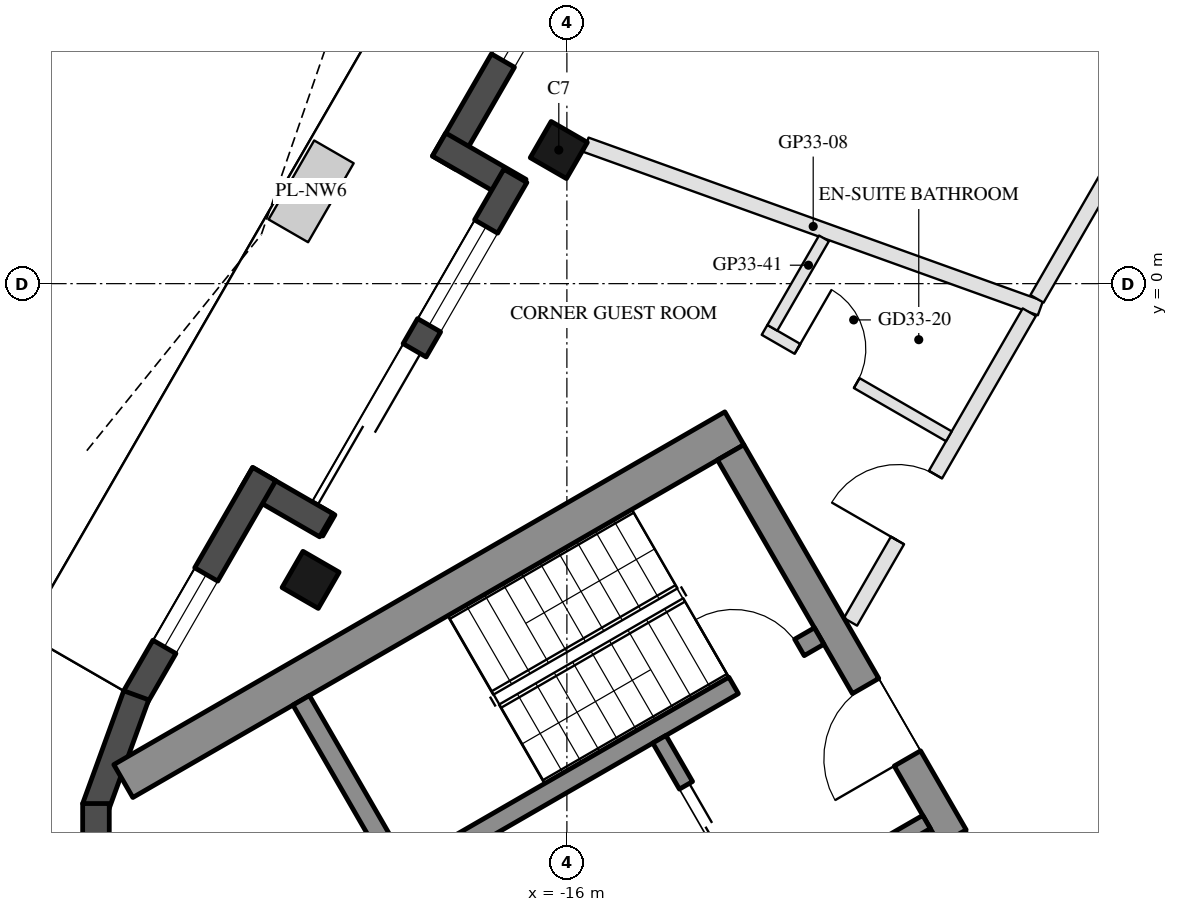
"""IFC4 building model, lengths in metres.
Left out: names, types, materials, properties, quantities, classifications, styles, units other than length and angle.
Written with IfcOpenShell. Run it as: python <this file> out.ifc"""

import sys

from ifc_helpers import new_model, si_unit, direction, frame, frame_2d, origin, origin_2d, place, context, subcontext, project, spatial, rectangle, hollow_rectangle, extrude, boolean, halfspace, element, fill, save


model = new_model("IFC4")
c1 = context("Model", 3, precision=1e-05, world=origin(), true_north=direction((0.0, 1.0)))
c2 = subcontext(c1, "Body", "Model", "MODEL_VIEW")
j1 = project(units=[si_unit("LENGTHUNIT", "METRE"), si_unit("PLANEANGLEUNIT", "RADIAN")], contexts=[c1])
p1 = place(None, origin())
s1 = spatial("IfcSite", under=j1, at=p1, CompositionType="ELEMENT")
p2 = place(p1, origin())
s2 = spatial("IfcBuilding", under=s1, at=p2, CompositionType="ELEMENT")
p3 = place(p2, frame((0.0, 0.0, 317.0)))
s3 = spatial("IfcBuildingStorey", under=s2, at=p3, CompositionType="ELEMENT", Elevation=317.0)
p4 = place(p3, frame((-16.106, 1.758, 0.0), z_axis=(0.0, 0.0, 1.0), x_axis=(0.5, 0.866025403784, 0.0)))
e1 = element("IfcColumn", 1, at=p4, inside=s3, PredefinedType="COLUMN", context=c2, shape_type="SweptSolid", body=[
    boolean("DIFFERENCE", extrude(hollow_rectangle(XDim=0.55, YDim=0.55, WallThickness=0.025, at=origin_2d()), origin(), (0.0, 0.0, 1.0), 3.7), halfspace(frame((0.0, 0.0, 3.666), z_axis=(0.0, 0.0, 1.0), x_axis=(1.0, 0.0, 0.0)), False)),
])
p5 = place(p3, frame((-19.372, -3.898, 0.0), z_axis=(0.0, 0.0, 1.0), x_axis=(0.5, 0.866025403784, 0.0)))
e2 = element("IfcColumn", 2, at=p5, inside=s3, PredefinedType="COLUMN", context=c2, shape_type="SweptSolid", body=[
    boolean("DIFFERENCE", extrude(hollow_rectangle(XDim=0.55, YDim=0.55, WallThickness=0.025, at=origin_2d()), origin(), (0.0, 0.0, 1.0), 3.7), halfspace(frame((0.0, 0.0, 3.66), z_axis=(0.0, 0.0, 1.0), x_axis=(1.0, 0.0, 0.0)), False)),
])
p6 = place(p3, frame((-13.452, 8.806, 0.0), z_axis=(0.0, 0.0, 1.0), x_axis=(-0.499993893925, -0.8660289291, 0.0)))
e3 = element("IfcWall", 3, at=p6, inside=s3, PredefinedType="SOLIDWALL", context=c2, shape_type="SweptSolid", body=[
    extrude(rectangle(XDim=8.331, YDim=0.35, at=frame_2d((4.165, 0.0))), origin(), (0.0, 0.0, 1.0), 3.55),
])
p7 = place(p6, frame((1.525, 0.0, 0.0)))
e4 = element("IfcOpeningElement", 4, at=p7, cuts=e3, PredefinedType="OPENING", context=c2, shape_type="SweptSolid", body=[
    extrude(rectangle(XDim=2.4, YDim=2.4, at=frame_2d((1.2, 1.2))), frame((0.0, 0.185, 0.0), z_axis=(0.0, -1.0, 0.0), x_axis=(1.0, 0.0, 0.0)), (0.0, 0.0, 1.0), 0.37),
])
p8 = place(p6, frame((4.225, 0.0, 0.3)))
e5 = element("IfcOpeningElement", 5, at=p8, cuts=e3, PredefinedType="OPENING", context=c2, shape_type="SweptSolid", body=[
    extrude(rectangle(XDim=0.8, YDim=2.65, at=frame_2d((0.4, 1.325))), frame((0.0, 0.185, 0.0), z_axis=(0.0, -1.0, 0.0), x_axis=(1.0, 0.0, 0.0)), (0.0, 0.0, 1.0), 0.37),
])
p9 = place(p6, frame((5.779, 0.0, 0.3)))
e6 = element("IfcOpeningElement", 6, at=p9, cuts=e3, PredefinedType="OPENING", context=c2, shape_type="SweptSolid", body=[
    extrude(rectangle(XDim=1.0, YDim=2.65, at=frame_2d((0.5, 1.325))), frame((0.0, 0.185, 0.0), z_axis=(0.0, -1.0, 0.0), x_axis=(1.0, 0.0, 0.0)), (0.0, 0.0, 1.0), 0.37),
])
p10 = place(p3, frame((-17.681, 1.83, 0.0), z_axis=(0.0, 0.0, 1.0), x_axis=(0.866092288191, -0.499884134912, 0.0)))
e7 = element("IfcWall", 7, at=p10, inside=s3, PredefinedType="SOLIDWALL", context=c2, shape_type="SweptSolid", body=[
    extrude(rectangle(XDim=1.22, YDim=0.35, at=frame_2d((0.61, 0.0))), origin(), (0.0, 0.0, 1.0), 3.55),
])
p11 = place(p3, frame((-16.678, 1.418, 0.0), z_axis=(0.0, 0.0, 1.0), x_axis=(-0.499996591357, -0.866027371756, 0.0)))
e8 = element("IfcWall", 8, at=p11, inside=s3, PredefinedType="SOLIDWALL", context=c2, shape_type="SweptSolid", body=[
    extrude(rectangle(XDim=5.371, YDim=0.35, at=frame_2d((2.685, 0.0))), origin(), (0.0, 0.0, 1.0), 3.55),
])
p12 = place(p11, frame((2.651, 0.0, 0.0)))
e9 = element("IfcOpeningElement", 9, at=p12, cuts=e8, PredefinedType="OPENING", context=c2, shape_type="SweptSolid", body=[
    extrude(rectangle(XDim=2.4, YDim=2.4, at=frame_2d((1.2, 1.2))), frame((0.0, 0.185, 0.0), z_axis=(0.0, -1.0, 0.0), x_axis=(1.0, 0.0, 0.0)), (0.0, 0.0, 1.0), 0.37),
])
p13 = place(p11, frame((0.77, 0.0, 0.3)))
e10 = element("IfcOpeningElement", 10, at=p13, cuts=e8, PredefinedType="OPENING", context=c2, shape_type="SweptSolid", body=[
    extrude(rectangle(XDim=1.5, YDim=2.65, at=frame_2d((0.75, 1.325))), frame((0.0, 0.185, 0.0), z_axis=(0.0, -1.0, 0.0), x_axis=(1.0, 0.0, 0.0)), (0.0, 0.0, 1.0), 0.37),
])
p14 = place(p3, frame((-19.165, -3.18, 0.0), z_axis=(0.0, 0.0, 1.0), x_axis=(-0.866005645448, 0.500034220881, 0.0)))
e11 = element("IfcWall", 11, at=p14, inside=s3, PredefinedType="SOLIDWALL", context=c2, shape_type="SweptSolid", body=[
    extrude(rectangle(XDim=1.22, YDim=0.35, at=frame_2d((0.61, 0.0))), origin(), (0.0, 0.0, 1.0), 3.55),
])
p15 = place(p3, frame((-19.982, -2.506, 0.0), z_axis=(0.0, 0.0, 1.0), x_axis=(-0.500054617923, -0.865993867816, 0.0)))
e12 = element("IfcWall", 12, at=p15, inside=s3, PredefinedType="SOLIDWALL", context=c2, shape_type="SweptSolid", body=[
    extrude(rectangle(XDim=3.393, YDim=0.35, at=frame_2d((1.697, 0.0))), origin(), (0.0, 0.0, 1.0), 3.55),
])
p16 = place(p15, frame((1.525, 0.0, 0.3)))
e13 = element("IfcOpeningElement", 13, at=p16, cuts=e12, PredefinedType="OPENING", context=c2, shape_type="SweptSolid", body=[
    extrude(rectangle(XDim=1.1, YDim=2.65, at=frame_2d((0.55, 1.325))), frame((0.0, 0.185, 0.0), z_axis=(0.0, -1.0, 0.0), x_axis=(1.0, 0.0, 0.0)), (0.0, 0.0, 1.0), 0.37),
])
for number, where, z_axis, x_axis in (
    (14, (-21.666, -5.417, 0.0), (0.0, 0.0, 1.0), (-0.342, -0.94, 0.0)),
    (15, (-22.196, -6.841, 0.0), (0.0, 0.0, 1.0), (0.0, -1.0, 0.0)),
):
    element("IfcWall", number, at=place(p3, frame(where, z_axis=z_axis, x_axis=x_axis)), inside=s3, PredefinedType="SOLIDWALL", context=c2, shape_type="SweptSolid", body=[
        extrude(rectangle(XDim=1.579, YDim=0.35, at=frame_2d((0.79, 0.0))), origin(), (0.0, 0.0, 1.0), 3.55),
    ])
p17 = place(p3, frame((-13.797, -1.903, 0.0), z_axis=(0.0, 0.0, 1.0), x_axis=(-0.866025286072, -0.500000203884, 0.0)))
e16 = element("IfcWall", 16, at=p17, inside=s3, PredefinedType="SHEAR", context=c2, shape_type="SweptSolid", body=[
    extrude(rectangle(XDim=9.283, YDim=0.5, at=frame_2d((4.641, 0.0))), origin(), (0.0, 0.0, 1.0), 3.5),
])
p18 = place(p3, frame((-13.845, -2.22, 0.0), z_axis=(0.0, 0.0, 1.0), x_axis=(0.500004234368, -0.866022959057, 0.0)))
e17 = element("IfcWall", 17, at=p18, inside=s3, PredefinedType="SHEAR", context=c2, shape_type="SweptSolid", body=[
    extrude(rectangle(XDim=10.0, YDim=0.4, at=frame_2d((5.0, 0.0))), origin(), (0.0, 0.0, 1.0), 3.5),
])
p19 = place(p18, frame((3.55, 0.0, 0.0)))
e18 = element("IfcOpeningElement", 18, at=p19, cuts=e17, PredefinedType="OPENING", context=c2, shape_type="SweptSolid", body=[
    extrude(rectangle(XDim=1.1, YDim=2.1, at=frame_2d((0.55, 1.05))), frame((0.0, 0.21, 0.0), z_axis=(0.0, -1.0, 0.0), x_axis=(1.0, 0.0, 0.0)), (0.0, 0.0, 1.0), 0.42),
])
p20 = place(p18, frame((5.85, 0.0, 0.0)))
e19 = element("IfcOpeningElement", 19, at=p20, cuts=e17, PredefinedType="OPENING", context=c2, shape_type="SweptSolid", body=[
    extrude(rectangle(XDim=1.4, YDim=2.1, at=frame_2d((0.7, 1.05))), frame((0.0, 0.21, 0.0), z_axis=(0.0, -1.0, 0.0), x_axis=(1.0, 0.0, 0.0)), (0.0, 0.0, 1.0), 0.42),
])
p21 = place(p3, frame((-12.681, -4.636, 0.0), z_axis=(0.0, 0.0, 1.0), x_axis=(-0.866021702275, -0.500006411147, 0.0)))
e20 = element("IfcWall", 20, at=p21, inside=s3, PredefinedType="SHEAR", context=c2, shape_type="SweptSolid", body=[
    extrude(rectangle(XDim=6.45, YDim=0.25, at=frame_2d((3.225, 0.0))), origin(), (0.0, 0.0, 1.0), 3.5),
])
p22 = place(p21, frame((0.3, 0.0, 0.0)))
e21 = element("IfcOpeningElement", 21, at=p22, cuts=e20, PredefinedType="OPENING", context=c2, shape_type="SweptSolid", body=[
    extrude(rectangle(XDim=1.0, YDim=2.1, at=frame_2d((0.5, 1.05))), frame((0.0, 0.135, 0.0), z_axis=(0.0, -1.0, 0.0), x_axis=(1.0, 0.0, 0.0)), (0.0, 0.0, 1.0), 0.27),
])
p23 = place(p3, frame((-19.496, -5.482, 0.0), z_axis=(0.0, 0.0, 1.0), x_axis=(0.499990435942, -0.866030925526, 0.0)))
e22 = element("IfcWall", 22, at=p23, inside=s3, PredefinedType="SHEAR", context=c2, shape_type="SweptSolid", body=[
    extrude(rectangle(XDim=2.55, YDim=0.25, at=frame_2d((1.275, 0.0))), origin(), (0.0, 0.0, 1.0), 3.5),
])
p24 = place(p3, frame((-14.783, -5.995, 0.0), z_axis=(0.0, 0.0, 1.0), x_axis=(0.49994636267, -0.866056369097, 0.0)))
e23 = element("IfcWall", 23, at=p24, inside=s3, PredefinedType="SHEAR", context=c2, shape_type="SweptSolid", body=[
    extrude(rectangle(XDim=2.8, YDim=0.2, at=frame_2d((1.4, 0.0))), origin(), (0.0, 0.0, 1.0), 3.5),
])
p25 = place(p24, frame((0.7, 0.0, 0.0)))
e24 = element("IfcOpeningElement", 24, at=p25, cuts=e23, PredefinedType="OPENING", context=c2, shape_type="SweptSolid", body=[
    extrude(rectangle(XDim=1.2, YDim=2.1, at=frame_2d((0.6, 1.05))), frame((0.0, 0.11, 0.0), z_axis=(0.0, -1.0, 0.0), x_axis=(1.0, 0.0, 0.0)), (0.0, 0.0, 1.0), 0.22),
])
p26 = place(p3, frame((-11.268, -7.083, 0.0), z_axis=(0.0, 0.0, 1.0), x_axis=(-0.866050077142, -0.499957262057, 0.0)))
e25 = element("IfcWall", 25, at=p26, inside=s3, PredefinedType="SHEAR", context=c2, shape_type="SweptSolid", body=[
    extrude(rectangle(XDim=2.4, YDim=0.2, at=frame_2d((1.2, 0.0))), origin(), (0.0, 0.0, 1.0), 3.5),
])
p27 = place(p3, frame((-15.749, 1.827, 0.0), z_axis=(0.0, 0.0, 1.0), x_axis=(0.941030372408, -0.3383220924, 0.0)))
e26 = element("IfcWall", 26, at=p27, inside=s3, PredefinedType="PARTITIONING", context=c2, shape_type="SweptSolid", body=[
    extrude(rectangle(XDim=6.353, YDim=0.2, at=frame_2d((3.177, 0.0))), origin(), (0.0, 0.0, 1.0), 3.1),
])
p28 = place(p3, frame((-9.815, -0.2, 0.0), z_axis=(0.0, 0.0, 1.0), x_axis=(0.499995091154, 0.866028237889, 0.0)))
e27 = element("IfcWall", 27, at=p28, inside=s3, PredefinedType="PARTITIONING", context=c2, shape_type="SweptSolid", body=[
    extrude(rectangle(XDim=10.18, YDim=0.2, at=frame_2d((5.09, 0.0))), origin(), (0.0, 0.0, 1.0), 3.1),
])
p29 = place(p28, frame((6.73, 0.0, 0.0)))
e28 = element("IfcOpeningElement", 28, at=p29, cuts=e27, PredefinedType="OPENING", context=c2, shape_type="SweptSolid", body=[
    extrude(rectangle(XDim=1.0, YDim=2.1, at=frame_2d((0.5, 1.05))), frame((0.0, 0.11, 0.0), z_axis=(0.0, -1.0, 0.0), x_axis=(1.0, 0.0, 0.0)), (0.0, 0.0, 1.0), 0.22),
])
p30 = place(p3, frame((-12.269, -4.45, 0.0), z_axis=(0.0, 0.0, 1.0), x_axis=(0.500006955494, 0.866021387991, 0.0)))
e29 = element("IfcWall", 29, at=p30, inside=s3, PredefinedType="PARTITIONING", context=c2, shape_type="SweptSolid", body=[
    extrude(rectangle(XDim=4.705, YDim=0.2, at=frame_2d((2.352, 0.0))), origin(), (0.0, 0.0, 1.0), 3.1),
])
p31 = place(p30, frame((1.237, 0.0, 0.0)))
e30 = element("IfcOpeningElement", 30, at=p31, cuts=e29, PredefinedType="OPENING", context=c2, shape_type="SweptSolid", body=[
    extrude(rectangle(XDim=1.0, YDim=2.1, at=frame_2d((0.5, 1.05))), frame((0.0, 0.11, 0.0), z_axis=(0.0, -1.0, 0.0), x_axis=(1.0, 0.0, 0.0)), (0.0, 0.0, 1.0), 0.22),
])
p32 = place(p3, frame((-13.399, -0.608, 0.0), z_axis=(0.0, 0.0, 1.0), x_axis=(0.866034573852, -0.49998411664, 0.0)))
e31 = element("IfcWall", 31, at=p32, inside=s3, PredefinedType="PARTITIONING", context=c2, shape_type="SweptSolid", body=[
    extrude(rectangle(XDim=2.8, YDim=0.15, at=frame_2d((1.4, 0.0))), origin(), (0.0, 0.0, 1.0), 3.55),
])
p33 = place(p32, frame((0.5, 0.0, 0.0)))
e32 = element("IfcOpeningElement", 32, at=p33, cuts=e31, PredefinedType="OPENING", context=c2, shape_type="SweptSolid", body=[
    extrude(rectangle(XDim=0.9, YDim=2.1, at=frame_2d((0.45, 1.05))), frame((0.0, 0.085, 0.0), z_axis=(0.0, -1.0, 0.0), x_axis=(1.0, 0.0, 0.0)), (0.0, 0.0, 1.0), 0.17),
])
p34 = place(p3, frame((-12.618, 0.595, 0.0), z_axis=(0.0, 0.0, 1.0), x_axis=(-0.499966175448, -0.866044931518, 0.0)))
e33 = element("IfcWall", 33, at=p34, inside=s3, PredefinedType="PARTITIONING", context=c2, shape_type="SweptSolid", body=[
    extrude(rectangle(XDim=1.358, YDim=0.15, at=frame_2d((0.679, 0.0))), origin(), (0.0, 0.0, 1.0), 3.1),
])
p35 = place(p9, origin())
e34 = element("IfcWindow", 34, at=p35, inside=s3, PartitioningType="SINGLE_PANEL", PredefinedType="WINDOW", context=c2, shape_type="SweptSolid", body=[
    extrude(rectangle(XDim=1.0, YDim=2.65, at=frame_2d((0.5, 1.325))), frame((0.0, 0.03, 0.0), z_axis=(0.0, -1.0, 0.0), x_axis=(1.0, 0.0, 0.0)), (0.0, 0.0, 1.0), 0.06),
])
fill(e6, e34)
p36 = place(p12, frame((2.4, 0.0, 0.0), z_axis=(0.0, 0.0, 1.0), x_axis=(-1.0, 0.0, 0.0)))
e35 = element("IfcDoor", 35, at=p36, inside=s3, OperationType="SLIDING_TO_LEFT", PredefinedType="DOOR", context=c2, shape_type="SweptSolid", body=[
    extrude(rectangle(XDim=2.4, YDim=2.4, at=frame_2d((1.2, 1.2))), frame((0.0, 0.025, 0.0), z_axis=(0.0, -1.0, 0.0), x_axis=(1.0, 0.0, 0.0)), (0.0, 0.0, 1.0), 0.05),
])
fill(e9, e35)
p37 = place(p13, origin())
e36 = element("IfcWindow", 36, at=p37, inside=s3, PartitioningType="SINGLE_PANEL", PredefinedType="WINDOW", context=c2, shape_type="SweptSolid", body=[
    extrude(rectangle(XDim=1.5, YDim=2.65, at=frame_2d((0.75, 1.325))), frame((0.0, 0.03, 0.0), z_axis=(0.0, -1.0, 0.0), x_axis=(1.0, 0.0, 0.0)), (0.0, 0.0, 1.0), 0.06),
])
fill(e10, e36)
p38 = place(p16, origin())
e37 = element("IfcWindow", 37, at=p38, inside=s3, PartitioningType="SINGLE_PANEL", PredefinedType="WINDOW", context=c2, shape_type="SweptSolid", body=[
    extrude(rectangle(XDim=1.1, YDim=2.65, at=frame_2d((0.55, 1.325))), frame((0.0, 0.03, 0.0), z_axis=(0.0, -1.0, 0.0), x_axis=(1.0, 0.0, 0.0)), (0.0, 0.0, 1.0), 0.06),
])
fill(e13, e37)
p39 = place(p25, origin())
e38 = element("IfcDoor", 38, at=p39, inside=s3, OperationType="DOUBLE_DOOR_SLIDING", PredefinedType="DOOR", context=c2, shape_type="SweptSolid", body=[
    extrude(rectangle(XDim=1.2, YDim=2.1, at=frame_2d((0.6, 1.05))), frame((0.0, 0.025, 0.0), z_axis=(0.0, -1.0, 0.0), x_axis=(1.0, 0.0, 0.0)), (0.0, 0.0, 1.0), 0.05),
])
fill(e24, e38)
p40 = place(p19, frame((1.1, 0.0, 0.0), z_axis=(0.0, 0.0, 1.0), x_axis=(-1.0, 0.0, 0.0)))
e39 = element("IfcDoor", 39, at=p40, inside=s3, OperationType="SINGLE_SWING_LEFT", PredefinedType="DOOR", context=c2, shape_type="SweptSolid", body=[
    extrude(rectangle(XDim=1.1, YDim=2.1, at=frame_2d((0.55, 1.05))), frame((0.0, 0.025, 0.0), z_axis=(0.0, -1.0, 0.0), x_axis=(1.0, 0.0, 0.0)), (0.0, 0.0, 1.0), 0.05),
])
fill(e18, e39)
p41 = place(p22, frame((1.0, 0.0, 0.0), z_axis=(0.0, 0.0, 1.0), x_axis=(-1.0, 0.0, 0.0)))
e40 = element("IfcDoor", 40, at=p41, inside=s3, OperationType="SINGLE_SWING_LEFT", PredefinedType="DOOR", context=c2, shape_type="SweptSolid", body=[
    extrude(rectangle(XDim=1.0, YDim=2.1, at=frame_2d((0.5, 1.05))), frame((0.0, 0.025, 0.0), z_axis=(0.0, -1.0, 0.0), x_axis=(1.0, 0.0, 0.0)), (0.0, 0.0, 1.0), 0.05),
])
fill(e21, e40)
p42 = place(p33, origin())
e41 = element("IfcDoor", 41, at=p42, inside=s3, OperationType="SINGLE_SWING_LEFT", PredefinedType="DOOR", context=c2, shape_type="SweptSolid", body=[
    extrude(rectangle(XDim=0.9, YDim=2.1, at=frame_2d((0.45, 1.05))), frame((0.0, 0.025, 0.0), z_axis=(0.0, -1.0, 0.0), x_axis=(1.0, 0.0, 0.0)), (0.0, 0.0, 1.0), 0.05),
])
fill(e32, e41)
p43 = place(p31, origin())
e42 = element("IfcDoor", 42, at=p43, inside=s3, OperationType="SINGLE_SWING_LEFT", PredefinedType="DOOR", context=c2, shape_type="SweptSolid", body=[
    extrude(rectangle(XDim=1.0, YDim=2.1, at=frame_2d((0.5, 1.05))), frame((0.0, 0.025, 0.0), z_axis=(0.0, -1.0, 0.0), x_axis=(1.0, 0.0, 0.0)), (0.0, 0.0, 1.0), 0.05),
])
fill(e30, e42)
save(model, sys.argv[1])
